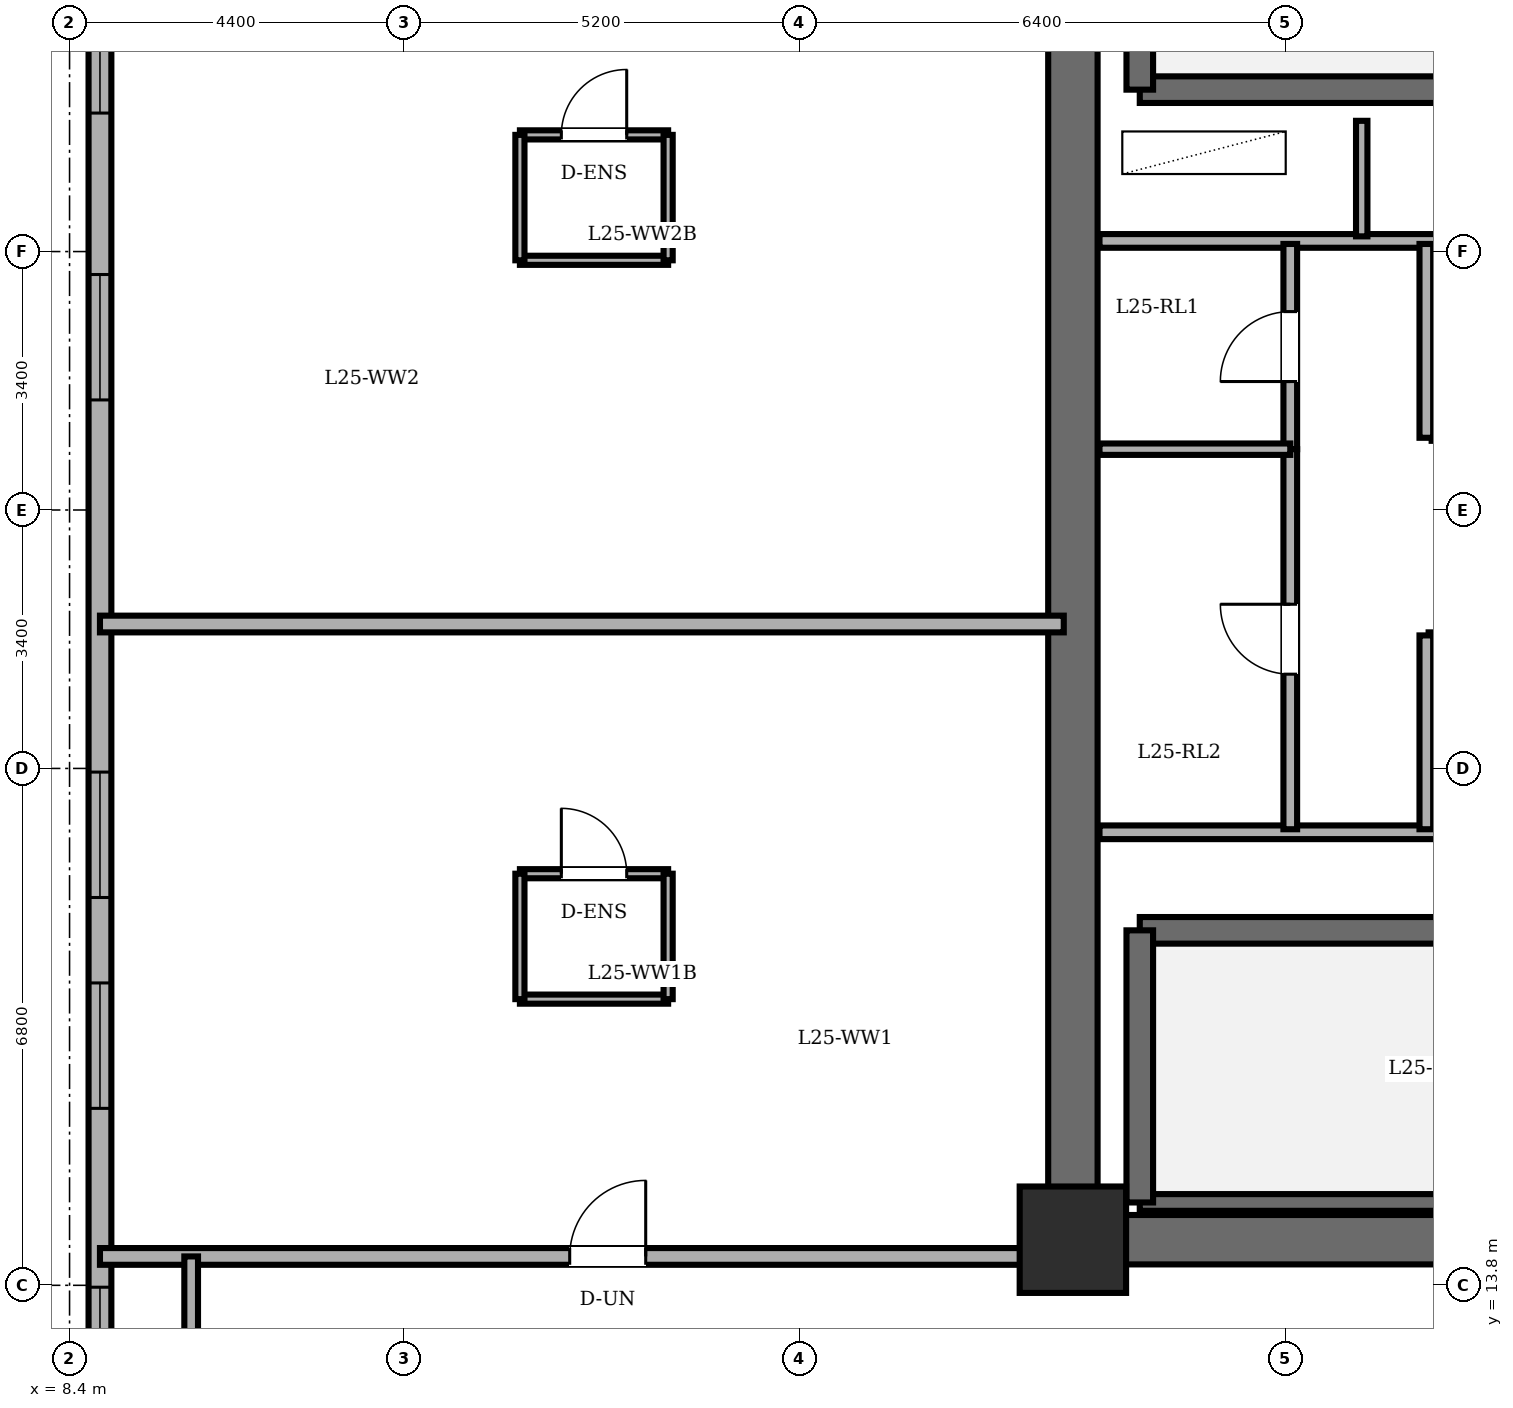
"""IFC4 building model, lengths in metres.
Left out: names, types, materials, properties, quantities, classifications, styles, units other than length and angle.
Written with IfcOpenShell. Run it as: python <this file> out.ifc"""

import sys

from ifc_helpers import new_model, si_unit, direction, frame, frame_2d, origin, origin_2d, place, context, subcontext, project, spatial, rectangle, extrude, element, fill, save


model = new_model("IFC4")
c1 = context("Model", 3, precision=1e-05, world=origin(), true_north=direction((0.0, 1.0)))
c2 = subcontext(c1, "Body", "Model", "MODEL_VIEW")
j1 = project(units=[si_unit("LENGTHUNIT", "METRE"), si_unit("PLANEANGLEUNIT", "RADIAN")], contexts=[c1])
p1 = place(None, origin())
s1 = spatial("IfcSite", under=j1, at=p1, CompositionType="ELEMENT")
p2 = place(p1, origin())
s2 = spatial("IfcBuilding", under=s1, at=p2, CompositionType="ELEMENT")
p3 = place(p2, frame((0.0, 0.0, 97.1)))
s3 = spatial("IfcBuildingStorey", under=s2, at=p3, CompositionType="ELEMENT", Elevation=97.1)
p4 = place(p3, frame((21.6, 14.4, 0.0), z_axis=(0.0, 0.0, 1.0), x_axis=(1.0, 0.0, 0.0)))
e1 = element("IfcColumn", 1, at=p4, inside=s3, PredefinedType="COLUMN", context=c2, shape_type="SweptSolid", body=[
    extrude(rectangle(XDim=1.4, YDim=1.4, at=origin_2d()), origin(), (0.0, 0.0, 1.0), 3.6),
])
p5 = place(p3, frame((8.8, 38.2, 0.0), z_axis=(0.0, 0.0, 1.0), x_axis=(0.0, -1.0, 0.0)))
e2 = element("IfcWall", 2, at=p5, inside=s3, PredefinedType="SOLIDWALL", context=c2, shape_type="SweptSolid", body=[
    extrude(rectangle(XDim=28.4, YDim=0.3, at=frame_2d((14.2, 0.0))), origin(), (0.0, 0.0, 1.0), 3.4),
])
p6 = place(p5, frame((2.325, 0.0, 0.85)))
e3 = element("IfcOpeningElement", 3, at=p6, cuts=e2, PredefinedType="OPENING", context=c2, shape_type="SweptSolid", body=[
    extrude(rectangle(XDim=1.65, YDim=1.55, at=frame_2d((0.825, 0.775))), frame((0.0, 0.16, 0.0), z_axis=(0.0, -1.0, 0.0), x_axis=(1.0, 0.0, 0.0)), (0.0, 0.0, 1.0), 0.32),
])
p7 = place(p5, frame((7.328, 0.0, 0.85)))
e4 = element("IfcOpeningElement", 4, at=p7, cuts=e2, PredefinedType="OPENING", context=c2, shape_type="SweptSolid", body=[
    extrude(rectangle(XDim=1.65, YDim=1.55, at=frame_2d((0.825, 0.775))), frame((0.0, 0.16, 0.0), z_axis=(0.0, -1.0, 0.0), x_axis=(1.0, 0.0, 0.0)), (0.0, 0.0, 1.0), 0.32),
])
p8 = place(p5, frame((11.102, 0.0, 0.85)))
e5 = element("IfcOpeningElement", 5, at=p8, cuts=e2, PredefinedType="OPENING", context=c2, shape_type="SweptSolid", body=[
    extrude(rectangle(XDim=1.65, YDim=1.55, at=frame_2d((0.825, 0.775))), frame((0.0, 0.16, 0.0), z_axis=(0.0, -1.0, 0.0), x_axis=(1.0, 0.0, 0.0)), (0.0, 0.0, 1.0), 0.32),
])
p9 = place(p5, frame((17.648, 0.0, 0.85)))
e6 = element("IfcOpeningElement", 6, at=p9, cuts=e2, PredefinedType="OPENING", context=c2, shape_type="SweptSolid", body=[
    extrude(rectangle(XDim=1.65, YDim=1.55, at=frame_2d((0.825, 0.775))), frame((0.0, 0.16, 0.0), z_axis=(0.0, -1.0, 0.0), x_axis=(1.0, 0.0, 0.0)), (0.0, 0.0, 1.0), 0.32),
])
p10 = place(p5, frame((20.422, 0.0, 0.85)))
e7 = element("IfcOpeningElement", 7, at=p10, cuts=e2, PredefinedType="OPENING", context=c2, shape_type="SweptSolid", body=[
    extrude(rectangle(XDim=1.65, YDim=1.55, at=frame_2d((0.825, 0.775))), frame((0.0, 0.16, 0.0), z_axis=(0.0, -1.0, 0.0), x_axis=(1.0, 0.0, 0.0)), (0.0, 0.0, 1.0), 0.32),
])
p11 = place(p5, frame((24.425, 0.0, 0.85)))
e8 = element("IfcOpeningElement", 8, at=p11, cuts=e2, PredefinedType="OPENING", context=c2, shape_type="SweptSolid", body=[
    extrude(rectangle(XDim=1.65, YDim=1.55, at=frame_2d((0.825, 0.775))), frame((0.0, 0.16, 0.0), z_axis=(0.0, -1.0, 0.0), x_axis=(1.0, 0.0, 0.0)), (0.0, 0.0, 1.0), 0.32),
])
p12 = place(p3, frame((21.6, 14.4, 0.0), z_axis=(0.0, 0.0, 1.0), x_axis=(0.0, 1.0, 0.0)))
e9 = element("IfcWall", 9, at=p12, inside=s3, PredefinedType="SHEAR", context=c2, shape_type="SweptSolid", body=[
    extrude(rectangle(XDim=19.2, YDim=0.65, at=frame_2d((9.6, 0.0))), origin(), (0.0, 0.0, 1.0), 3.4),
])
p13 = place(p3, frame((37.2, 14.4, 0.0), z_axis=(0.0, 0.0, 1.0), x_axis=(-1.0, 0.0, 0.0)))
e10 = element("IfcWall", 10, at=p13, inside=s3, PredefinedType="SHEAR", context=c2, shape_type="SweptSolid", body=[
    extrude(rectangle(XDim=15.6, YDim=0.65, at=frame_2d((7.8, 0.0))), origin(), (0.0, 0.0, 1.0), 3.4),
])
p14 = place(p3, frame((22.48, 29.53, 0.0), z_axis=(0.0, 0.0, 1.0), x_axis=(1.0, 0.0, 0.0)))
e11 = element("IfcWall", 11, at=p14, inside=s3, PredefinedType="SOLIDWALL", context=c2, shape_type="SweptSolid", body=[
    extrude(rectangle(XDim=7.79, YDim=0.35, at=frame_2d((3.895, 0.0))), origin(), (0.0, 0.0, 1.0), 3.4),
])
p15 = place(p3, frame((22.48, 29.53, 0.0), z_axis=(0.0, 0.0, 1.0), x_axis=(0.0, 1.0, 0.0)))
e12 = element("IfcWall", 12, at=p15, inside=s3, PredefinedType="SOLIDWALL", context=c2, shape_type="SweptSolid", body=[
    extrude(rectangle(XDim=3.58, YDim=0.35, at=frame_2d((1.79, 0.0))), origin(), (0.0, 0.0, 1.0), 3.4),
])
p16 = place(p3, frame((22.48, 18.47, 0.0), z_axis=(0.0, 0.0, 1.0), x_axis=(1.0, 0.0, 0.0)))
e13 = element("IfcWall", 13, at=p16, inside=s3, PredefinedType="SOLIDWALL", context=c2, shape_type="SweptSolid", body=[
    extrude(rectangle(XDim=7.79, YDim=0.35, at=frame_2d((3.895, 0.0))), origin(), (0.0, 0.0, 1.0), 3.4),
])
p17 = place(p3, frame((22.48, 14.89, 0.0), z_axis=(0.0, 0.0, 1.0), x_axis=(1.0, 0.0, 0.0)))
e14 = element("IfcWall", 14, at=p17, inside=s3, PredefinedType="PARTITIONING", context=c2, shape_type="SweptSolid", body=[
    extrude(rectangle(XDim=7.79, YDim=0.22, at=frame_2d((3.895, 0.0))), origin(), (0.0, 0.0, 1.0), 3.4),
])
p18 = place(p3, frame((22.48, 14.89, 0.0), z_axis=(0.0, 0.0, 1.0), x_axis=(0.0, 1.0, 0.0)))
e15 = element("IfcWall", 15, at=p18, inside=s3, PredefinedType="SOLIDWALL", context=c2, shape_type="SweptSolid", body=[
    extrude(rectangle(XDim=3.58, YDim=0.35, at=frame_2d((1.79, 0.0))), origin(), (0.0, 0.0, 1.0), 3.4),
])
p19 = place(p3, frame((21.95, 27.54, 0.0), z_axis=(0.0, 0.0, 1.0), x_axis=(1.0, 0.0, 0.0)))
e16 = element("IfcWall", 16, at=p19, inside=s3, PredefinedType="PARTITIONING", context=c2, shape_type="SweptSolid", body=[
    extrude(rectangle(XDim=10.56, YDim=0.18, at=frame_2d((5.28, 0.0))), origin(), (0.0, 0.0, 1.0), 3.4),
])
p20 = place(p3, frame((25.4, 27.6, 0.0), z_axis=(0.0, 0.0, 1.0), x_axis=(0.0, 1.0, 0.0)))
e17 = element("IfcWall", 17, at=p20, inside=s3, PredefinedType="PARTITIONING", context=c2, shape_type="SweptSolid", body=[
    extrude(rectangle(XDim=1.52, YDim=0.15, at=frame_2d((0.76, 0.0))), origin(), (0.0, 0.0, 1.0), 3.4),
])
p21 = place(p3, frame((21.95, 19.76, 0.0), z_axis=(0.0, 0.0, 1.0), x_axis=(1.0, 0.0, 0.0)))
e18 = element("IfcWall", 18, at=p21, inside=s3, PredefinedType="PARTITIONING", context=c2, shape_type="SweptSolid", body=[
    extrude(rectangle(XDim=14.87, YDim=0.18, at=frame_2d((7.435, 0.0))), origin(), (0.0, 0.0, 1.0), 3.4),
])
p22 = place(p3, frame((28.34, 25.0, 0.0), z_axis=(0.0, 0.0, 1.0), x_axis=(-1.0, 0.0, 0.0)))
e19 = element("IfcWall", 19, at=p22, inside=s3, PredefinedType="PARTITIONING", context=c2, shape_type="SweptSolid", body=[
    extrude(rectangle(XDim=2.02, YDim=0.18, at=frame_2d((1.01, 0.0))), origin(), (0.0, 0.0, 1.0), 3.4),
])
p23 = place(p22, frame((0.435, 0.0, 0.0)))
e20 = element("IfcOpeningElement", 20, at=p23, cuts=e19, PredefinedType="OPENING", context=c2, shape_type="SweptSolid", body=[
    extrude(rectangle(XDim=1.15, YDim=2.2, at=frame_2d((0.575, 1.1))), frame((0.0, 0.1, 0.0), z_axis=(0.0, -1.0, 0.0), x_axis=(1.0, 0.0, 0.0)), (0.0, 0.0, 1.0), 0.2),
])
p24 = place(p3, frame((26.28, 22.3, 0.0), z_axis=(0.0, 0.0, 1.0), x_axis=(1.0, 0.0, 0.0)))
e21 = element("IfcWall", 21, at=p24, inside=s3, PredefinedType="PARTITIONING", context=c2, shape_type="SweptSolid", body=[
    extrude(rectangle(XDim=2.0, YDim=0.18, at=frame_2d((1.0, 0.0))), origin(), (0.0, 0.0, 1.0), 3.4),
])
p25 = place(p24, frame((0.425, 0.0, 0.0)))
e22 = element("IfcOpeningElement", 22, at=p25, cuts=e21, PredefinedType="OPENING", context=c2, shape_type="SweptSolid", body=[
    extrude(rectangle(XDim=1.15, YDim=2.2, at=frame_2d((0.575, 1.1))), frame((0.0, 0.1, 0.0), z_axis=(0.0, -1.0, 0.0), x_axis=(1.0, 0.0, 0.0)), (0.0, 0.0, 1.0), 0.2),
])
p26 = place(p3, frame((24.46, 24.8, 0.0), z_axis=(0.0, 0.0, 1.0), x_axis=(0.0, 1.0, 0.0)))
e23 = element("IfcWall", 23, at=p26, inside=s3, PredefinedType="PARTITIONING", context=c2, shape_type="SweptSolid", body=[
    extrude(rectangle(XDim=2.7, YDim=0.18, at=frame_2d((1.35, 0.0))), origin(), (0.0, 0.0, 1.0), 3.4),
])
p27 = place(p26, frame((0.89, 0.0, 0.0)))
e24 = element("IfcOpeningElement", 24, at=p27, cuts=e23, PredefinedType="OPENING", context=c2, shape_type="SweptSolid", body=[
    extrude(rectangle(XDim=0.92, YDim=2.1, at=frame_2d((0.46, 1.05))), frame((0.0, 0.1, 0.0), z_axis=(0.0, -1.0, 0.0), x_axis=(1.0, 0.0, 0.0)), (0.0, 0.0, 1.0), 0.2),
])
p28 = place(p3, frame((24.46, 19.8, 0.0), z_axis=(0.0, 0.0, 1.0), x_axis=(0.0, 1.0, 0.0)))
e25 = element("IfcWall", 25, at=p28, inside=s3, PredefinedType="PARTITIONING", context=c2, shape_type="SweptSolid", body=[
    extrude(rectangle(XDim=5.0, YDim=0.18, at=frame_2d((2.5, 0.0))), origin(), (0.0, 0.0, 1.0), 3.4),
])
p29 = place(p28, frame((2.04, 0.0, 0.0)))
e26 = element("IfcOpeningElement", 26, at=p29, cuts=e25, PredefinedType="OPENING", context=c2, shape_type="SweptSolid", body=[
    extrude(rectangle(XDim=0.92, YDim=2.1, at=frame_2d((0.46, 1.05))), frame((0.0, 0.1, 0.0), z_axis=(0.0, -1.0, 0.0), x_axis=(1.0, 0.0, 0.0)), (0.0, 0.0, 1.0), 0.2),
])
p30 = place(p3, frame((21.95, 24.8, 0.0), z_axis=(0.0, 0.0, 1.0), x_axis=(1.0, 0.0, 0.0)))
e27 = element("IfcWall", 27, at=p30, inside=s3, PredefinedType="PARTITIONING", context=c2, shape_type="SweptSolid", body=[
    extrude(rectangle(XDim=2.51, YDim=0.15, at=frame_2d((1.255, 0.0))), origin(), (0.0, 0.0, 1.0), 3.4),
])
for number, where, z_axis, x_axis in (
    (28, (26.25, 24.95, 0.0), (0.0, 0.0, 1.0), (0.0, 1.0, 0.0)),
    (29, (26.25, 19.8, 0.0), (0.0, 0.0, 1.0), (0.0, 1.0, 0.0)),
):
    element("IfcWall", number, at=place(p3, frame(where, z_axis=z_axis, x_axis=x_axis)), inside=s3, PredefinedType="PARTITIONING", context=c2, shape_type="SweptSolid", body=[
        extrude(rectangle(XDim=2.55, YDim=0.18, at=frame_2d((1.275, 0.0))), origin(), (0.0, 0.0, 1.0), 3.4),
    ])
p31 = place(p3, frame((14.325, 19.215, 0.0), z_axis=(0.0, 0.0, 1.0), x_axis=(1.0, 0.0, 0.0)))
e30 = element("IfcWall", 30, at=p31, inside=s3, PredefinedType="PARTITIONING", context=c2, shape_type="SweptSolid", body=[
    extrude(rectangle(XDim=1.95, YDim=0.12, at=frame_2d((0.975, 0.0))), origin(), (0.0, 0.0, 1.0), 3.4),
])
p32 = place(p31, frame((0.545, 0.0, 0.0)))
e31 = element("IfcOpeningElement", 31, at=p32, cuts=e30, PredefinedType="OPENING", context=c2, shape_type="SweptSolid", body=[
    extrude(rectangle(XDim=0.86, YDim=2.1, at=frame_2d((0.43, 1.05))), frame((0.0, 0.07, 0.0), z_axis=(0.0, -1.0, 0.0), x_axis=(1.0, 0.0, 0.0)), (0.0, 0.0, 1.0), 0.14),
])
p33 = place(p3, frame((16.275, 17.565, 0.0), z_axis=(0.0, 0.0, 1.0), x_axis=(-1.0, 0.0, 0.0)))
e32 = element("IfcWall", 32, at=p33, inside=s3, PredefinedType="PARTITIONING", context=c2, shape_type="SweptSolid", body=[
    extrude(rectangle(XDim=1.95, YDim=0.12, at=frame_2d((0.975, 0.0))), origin(), (0.0, 0.0, 1.0), 3.4),
])
for number, where, z_axis, x_axis in (
    (33, (14.325, 19.215, 0.0), (0.0, 0.0, 1.0), (0.0, -1.0, 0.0)),
    (34, (16.275, 17.565, 0.0), (0.0, 0.0, 1.0), (0.0, 1.0, 0.0)),
):
    element("IfcWall", number, at=place(p3, frame(where, z_axis=z_axis, x_axis=x_axis)), inside=s3, PredefinedType="PARTITIONING", context=c2, shape_type="SweptSolid", body=[
        extrude(rectangle(XDim=1.65, YDim=0.12, at=frame_2d((0.825, 0.0))), origin(), (0.0, 0.0, 1.0), 3.4),
    ])
p34 = place(p3, frame((14.325, 28.935, 0.0), z_axis=(0.0, 0.0, 1.0), x_axis=(1.0, 0.0, 0.0)))
e35 = element("IfcWall", 35, at=p34, inside=s3, PredefinedType="PARTITIONING", context=c2, shape_type="SweptSolid", body=[
    extrude(rectangle(XDim=1.95, YDim=0.12, at=frame_2d((0.975, 0.0))), origin(), (0.0, 0.0, 1.0), 3.4),
])
p35 = place(p34, frame((0.545, 0.0, 0.0)))
e36 = element("IfcOpeningElement", 36, at=p35, cuts=e35, PredefinedType="OPENING", context=c2, shape_type="SweptSolid", body=[
    extrude(rectangle(XDim=0.86, YDim=2.1, at=frame_2d((0.43, 1.05))), frame((0.0, 0.07, 0.0), z_axis=(0.0, -1.0, 0.0), x_axis=(1.0, 0.0, 0.0)), (0.0, 0.0, 1.0), 0.14),
])
p36 = place(p3, frame((16.275, 27.285, 0.0), z_axis=(0.0, 0.0, 1.0), x_axis=(-1.0, 0.0, 0.0)))
e37 = element("IfcWall", 37, at=p36, inside=s3, PredefinedType="PARTITIONING", context=c2, shape_type="SweptSolid", body=[
    extrude(rectangle(XDim=1.95, YDim=0.12, at=frame_2d((0.975, 0.0))), origin(), (0.0, 0.0, 1.0), 3.4),
])
for number, where, z_axis, x_axis in (
    (38, (14.325, 28.935, 0.0), (0.0, 0.0, 1.0), (0.0, -1.0, 0.0)),
    (39, (16.275, 27.285, 0.0), (0.0, 0.0, 1.0), (0.0, 1.0, 0.0)),
):
    element("IfcWall", number, at=place(p3, frame(where, z_axis=z_axis, x_axis=x_axis)), inside=s3, PredefinedType="PARTITIONING", context=c2, shape_type="SweptSolid", body=[
        extrude(rectangle(XDim=1.65, YDim=0.12, at=frame_2d((0.825, 0.0))), origin(), (0.0, 0.0, 1.0), 3.4),
    ])
p37 = place(p3, frame((8.8, 14.18, 0.0), z_axis=(0.0, 0.0, 1.0), x_axis=(1.0, 0.0, 0.0)))
e40 = element("IfcWall", 40, at=p37, inside=s3, PredefinedType="PARTITIONING", context=c2, shape_type="SweptSolid", body=[
    extrude(rectangle(XDim=12.68, YDim=0.22, at=frame_2d((6.34, 0.0))), origin(), (0.0, 0.0, 1.0), 3.4),
])
p38 = place(p37, frame((6.18, 0.0, 0.0)))
e41 = element("IfcOpeningElement", 41, at=p38, cuts=e40, PredefinedType="OPENING", context=c2, shape_type="SweptSolid", body=[
    extrude(rectangle(XDim=1.0, YDim=2.15, at=frame_2d((0.5, 1.075))), frame((0.0, 0.12, 0.0), z_axis=(0.0, -1.0, 0.0), x_axis=(1.0, 0.0, 0.0)), (0.0, 0.0, 1.0), 0.24),
])
p39 = place(p3, frame((8.8, 22.5, 0.0), z_axis=(0.0, 0.0, 1.0), x_axis=(1.0, 0.0, 0.0)))
e42 = element("IfcWall", 42, at=p39, inside=s3, PredefinedType="PARTITIONING", context=c2, shape_type="SweptSolid", body=[
    extrude(rectangle(XDim=12.68, YDim=0.22, at=frame_2d((6.34, 0.0))), origin(), (0.0, 0.0, 1.0), 3.4),
])
p40 = place(p3, frame((10.0, 11.72, 0.0), z_axis=(0.0, 0.0, 1.0), x_axis=(0.0, 1.0, 0.0)))
e43 = element("IfcWall", 43, at=p40, inside=s3, PredefinedType="PARTITIONING", context=c2, shape_type="SweptSolid", body=[
    extrude(rectangle(XDim=2.46, YDim=0.18, at=frame_2d((1.23, 0.0))), origin(), (0.0, 0.0, 1.0), 3.4),
])
p41 = place(p7, origin())
e44 = element("IfcWindow", 44, at=p41, inside=s3, PartitioningType="DOUBLE_PANEL_VERTICAL", PredefinedType="WINDOW", context=c2, shape_type="SweptSolid", body=[
    extrude(rectangle(XDim=1.65, YDim=1.55, at=frame_2d((0.825, 0.775))), frame((0.0, 0.03, 0.0), z_axis=(0.0, -1.0, 0.0), x_axis=(1.0, 0.0, 0.0)), (0.0, 0.0, 1.0), 0.06),
])
fill(e4, e44)
p42 = place(p8, origin())
e45 = element("IfcWindow", 45, at=p42, inside=s3, PartitioningType="DOUBLE_PANEL_VERTICAL", PredefinedType="WINDOW", context=c2, shape_type="SweptSolid", body=[
    extrude(rectangle(XDim=1.65, YDim=1.55, at=frame_2d((0.825, 0.775))), frame((0.0, 0.03, 0.0), z_axis=(0.0, -1.0, 0.0), x_axis=(1.0, 0.0, 0.0)), (0.0, 0.0, 1.0), 0.06),
])
fill(e5, e45)
p43 = place(p9, origin())
e46 = element("IfcWindow", 46, at=p43, inside=s3, PartitioningType="DOUBLE_PANEL_VERTICAL", PredefinedType="WINDOW", context=c2, shape_type="SweptSolid", body=[
    extrude(rectangle(XDim=1.65, YDim=1.55, at=frame_2d((0.825, 0.775))), frame((0.0, 0.03, 0.0), z_axis=(0.0, -1.0, 0.0), x_axis=(1.0, 0.0, 0.0)), (0.0, 0.0, 1.0), 0.06),
])
fill(e6, e46)
p44 = place(p10, origin())
e47 = element("IfcWindow", 47, at=p44, inside=s3, PartitioningType="DOUBLE_PANEL_VERTICAL", PredefinedType="WINDOW", context=c2, shape_type="SweptSolid", body=[
    extrude(rectangle(XDim=1.65, YDim=1.55, at=frame_2d((0.825, 0.775))), frame((0.0, 0.03, 0.0), z_axis=(0.0, -1.0, 0.0), x_axis=(1.0, 0.0, 0.0)), (0.0, 0.0, 1.0), 0.06),
])
fill(e7, e47)
p45 = place(p11, origin())
e48 = element("IfcWindow", 48, at=p45, inside=s3, PartitioningType="DOUBLE_PANEL_VERTICAL", PredefinedType="WINDOW", context=c2, shape_type="SweptSolid", body=[
    extrude(rectangle(XDim=1.65, YDim=1.55, at=frame_2d((0.825, 0.775))), frame((0.0, 0.03, 0.0), z_axis=(0.0, -1.0, 0.0), x_axis=(1.0, 0.0, 0.0)), (0.0, 0.0, 1.0), 0.06),
])
fill(e8, e48)
p46 = place(p27, origin())
e49 = element("IfcDoor", 49, at=p46, inside=s3, OperationType="SINGLE_SWING_LEFT", PredefinedType="DOOR", context=c2, shape_type="SweptSolid", body=[
    extrude(rectangle(XDim=0.92, YDim=2.1, at=frame_2d((0.46, 1.05))), frame((0.0, 0.025, 0.0), z_axis=(0.0, -1.0, 0.0), x_axis=(1.0, 0.0, 0.0)), (0.0, 0.0, 1.0), 0.05),
])
fill(e24, e49)
p47 = place(p29, origin())
e50 = element("IfcDoor", 50, at=p47, inside=s3, OperationType="SINGLE_SWING_RIGHT", PredefinedType="DOOR", context=c2, shape_type="SweptSolid", body=[
    extrude(rectangle(XDim=0.92, YDim=2.1, at=frame_2d((0.46, 1.05))), frame((0.0, 0.025, 0.0), z_axis=(0.0, -1.0, 0.0), x_axis=(1.0, 0.0, 0.0)), (0.0, 0.0, 1.0), 0.05),
])
fill(e26, e50)
p48 = place(p32, origin())
e51 = element("IfcDoor", 51, at=p48, inside=s3, OperationType="SINGLE_SWING_LEFT", PredefinedType="DOOR", context=c2, shape_type="SweptSolid", body=[
    extrude(rectangle(XDim=0.86, YDim=2.1, at=frame_2d((0.43, 1.05))), frame((0.0, 0.025, 0.0), z_axis=(0.0, -1.0, 0.0), x_axis=(1.0, 0.0, 0.0)), (0.0, 0.0, 1.0), 0.05),
])
fill(e31, e51)
p49 = place(p35, origin())
e52 = element("IfcDoor", 52, at=p49, inside=s3, OperationType="SINGLE_SWING_RIGHT", PredefinedType="DOOR", context=c2, shape_type="SweptSolid", body=[
    extrude(rectangle(XDim=0.86, YDim=2.1, at=frame_2d((0.43, 1.05))), frame((0.0, 0.025, 0.0), z_axis=(0.0, -1.0, 0.0), x_axis=(1.0, 0.0, 0.0)), (0.0, 0.0, 1.0), 0.05),
])
fill(e36, e52)
p50 = place(p38, origin())
e53 = element("IfcDoor", 53, at=p50, inside=s3, OperationType="SINGLE_SWING_RIGHT", PredefinedType="DOOR", context=c2, shape_type="SweptSolid", body=[
    extrude(rectangle(XDim=1.0, YDim=2.15, at=frame_2d((0.5, 1.075))), frame((0.0, 0.025, 0.0), z_axis=(0.0, -1.0, 0.0), x_axis=(1.0, 0.0, 0.0)), (0.0, 0.0, 1.0), 0.05),
])
fill(e41, e53)
save(model, sys.argv[1])
